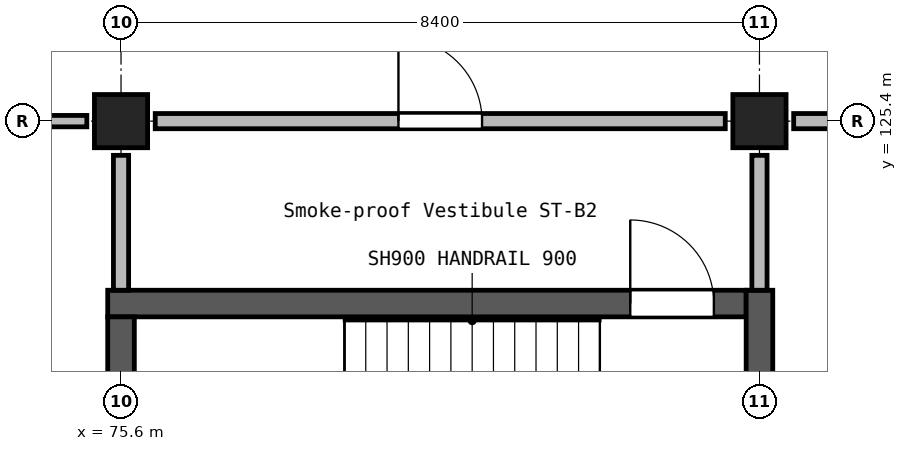
"""IFC4 building model, lengths in metres.
Left out: names, types, materials, properties, quantities, classifications, styles, units other than length and angle.
Written with IfcOpenShell. Run it as: python <this file> out.ifc"""

import sys

from ifc_helpers import new_model, si_unit, direction, frame, frame_2d, origin, origin_2d, place, context, subcontext, project, spatial, rectangle, extrude, element, fill, save


model = new_model("IFC4")
c1 = context("Model", 3, precision=1e-05, world=origin(), true_north=direction((0.0, 1.0)))
c2 = subcontext(c1, "Body", "Model", "MODEL_VIEW")
j1 = project(units=[si_unit("LENGTHUNIT", "METRE"), si_unit("PLANEANGLEUNIT", "RADIAN")], contexts=[c1])
p1 = place(None, origin())
s1 = spatial("IfcSite", under=j1, at=p1, CompositionType="ELEMENT")
p2 = place(p1, origin())
s2 = spatial("IfcBuilding", under=s1, at=p2, CompositionType="ELEMENT")
p3 = place(p2, frame((0.0, 0.0, 21.0)))
s3 = spatial("IfcBuildingStorey", under=s2, at=p3, CompositionType="ELEMENT", Elevation=21.0)
for number, where, z_axis, x_axis in (
    (1, (75.6, 125.4, 0.0), (0.0, 0.0, 1.0), (1.0, 0.0, 0.0)),
    (2, (84.0, 125.4, 0.0), (0.0, 0.0, 1.0), (1.0, 0.0, 0.0)),
):
    element("IfcColumn", number, at=place(p3, frame(where, z_axis=z_axis, x_axis=x_axis)), inside=s3, PredefinedType="COLUMN", context=c2, shape_type="SweptSolid", body=[
        extrude(rectangle(XDim=0.7, YDim=0.7, at=origin_2d()), origin(), (0.0, 0.0, 1.0), 3.9),
    ])
p4 = place(p3, frame((75.425, 123.0, 0.0), z_axis=(0.0, 0.0, 1.0), x_axis=(1.0, 0.0, 0.0)))
e3 = element("IfcWall", 3, at=p4, inside=s3, PredefinedType="SHEAR", context=c2, shape_type="SweptSolid", body=[
    extrude(rectangle(XDim=8.4, YDim=0.35, at=frame_2d((4.2, 0.0))), origin(), (0.0, 0.0, 1.0), 3.9),
])
p5 = place(p4, frame((6.875, 0.0, 0.0)))
e4 = element("IfcOpeningElement", 4, at=p5, cuts=e3, PredefinedType="OPENING", context=c2, shape_type="SweptSolid", body=[
    extrude(rectangle(XDim=1.1, YDim=2.1, at=frame_2d((0.55, 1.05))), frame((0.0, 0.185, 0.0), z_axis=(0.0, -1.0, 0.0), x_axis=(1.0, 0.0, 0.0)), (0.0, 0.0, 1.0), 0.37),
])
p6 = place(p3, frame((75.6, 117.425, 0.0), z_axis=(0.0, 0.0, 1.0), x_axis=(0.0, 1.0, 0.0)))
e5 = element("IfcWall", 5, at=p6, inside=s3, PredefinedType="SHEAR", context=c2, shape_type="SweptSolid", body=[
    extrude(rectangle(XDim=5.4, YDim=0.35, at=frame_2d((2.7, 0.0))), origin(), (0.0, 0.0, 1.0), 3.9),
])
p7 = place(p3, frame((84.0, 117.425, 0.0), z_axis=(0.0, 0.0, 1.0), x_axis=(0.0, 1.0, 0.0)))
e6 = element("IfcWall", 6, at=p7, inside=s3, PredefinedType="SHEAR", context=c2, shape_type="SweptSolid", body=[
    extrude(rectangle(XDim=5.75, YDim=0.35, at=frame_2d((2.875, 0.0))), origin(), (0.0, 0.0, 1.0), 3.9),
])
p8 = place(p3, frame((76.05, 125.4, 0.0), z_axis=(0.0, 0.0, 1.0), x_axis=(1.0, 0.0, 0.0)))
e7 = element("IfcWall", 7, at=p8, inside=s3, PredefinedType="SOLIDWALL", context=c2, shape_type="SweptSolid", body=[
    extrude(rectangle(XDim=7.5, YDim=0.2, at=frame_2d((3.75, 0.0))), origin(), (0.0, 0.0, 1.0), 3.6),
])
p9 = place(p8, frame((3.2, 0.0, 0.0)))
e8 = element("IfcOpeningElement", 8, at=p9, cuts=e7, PredefinedType="OPENING", context=c2, shape_type="SweptSolid", body=[
    extrude(rectangle(XDim=1.1, YDim=2.1, at=frame_2d((0.55, 1.05))), frame((0.0, 0.11, 0.0), z_axis=(0.0, -1.0, 0.0), x_axis=(1.0, 0.0, 0.0)), (0.0, 0.0, 1.0), 0.22),
])
p10 = place(p3, frame((84.45, 125.4, 0.0), z_axis=(0.0, 0.0, 1.0), x_axis=(1.0, 0.0, 0.0)))
e9 = element("IfcWall", 9, at=p10, inside=s3, PredefinedType="SOLIDWALL", context=c2, shape_type="SweptSolid", body=[
    extrude(rectangle(XDim=3.85, YDim=0.2, at=frame_2d((1.925, 0.0))), origin(), (0.0, 0.0, 1.0), 3.6),
])
p11 = place(p10, frame((1.15, 0.0, 0.0)))
e10 = element("IfcOpeningElement", 10, at=p11, cuts=e9, PredefinedType="OPENING", context=c2, shape_type="SweptSolid", body=[
    extrude(rectangle(XDim=1.0, YDim=2.1, at=frame_2d((0.5, 1.05))), frame((0.0, 0.11, 0.0), z_axis=(0.0, -1.0, 0.0), x_axis=(1.0, 0.0, 0.0)), (0.0, 0.0, 1.0), 0.22),
])
for number, where, z_axis, x_axis in (
    (11, (84.0, 123.175, 0.0), (0.0, 0.0, 1.0), (0.0, 1.0, 0.0)),
    (12, (75.6, 123.175, 0.0), (0.0, 0.0, 1.0), (0.0, 1.0, 0.0)),
):
    element("IfcWall", number, at=place(p3, frame(where, z_axis=z_axis, x_axis=x_axis)), inside=s3, PredefinedType="SOLIDWALL", context=c2, shape_type="SweptSolid", body=[
        extrude(rectangle(XDim=1.775, YDim=0.2, at=frame_2d((0.887, 0.0))), origin(), (0.0, 0.0, 1.0), 3.6),
    ])
p12 = place(p3, frame((67.65, 125.4, 0.0), z_axis=(0.0, 0.0, 1.0), x_axis=(1.0, 0.0, 0.0)))
e13 = element("IfcWall", 13, at=p12, inside=s3, PredefinedType="PARTITIONING", context=c2, shape_type="SweptSolid", body=[
    extrude(rectangle(XDim=7.5, YDim=0.15, at=frame_2d((3.75, 0.0))), origin(), (0.0, 0.0, 1.0), 3.6),
])
p13 = place(p12, frame((4.6, 0.0, 0.0)))
e14 = element("IfcOpeningElement", 14, at=p13, cuts=e13, PredefinedType="OPENING", context=c2, shape_type="SweptSolid", body=[
    extrude(rectangle(XDim=1.0, YDim=2.1, at=frame_2d((0.5, 1.05))), frame((0.0, 0.085, 0.0), z_axis=(0.0, -1.0, 0.0), x_axis=(1.0, 0.0, 0.0)), (0.0, 0.0, 1.0), 0.17),
])
p14 = place(p5, frame((1.1, 0.0, 0.0), z_axis=(0.0, 0.0, 1.0), x_axis=(-1.0, 0.0, 0.0)))
e15 = element("IfcDoor", 15, at=p14, inside=s3, OperationType="SINGLE_SWING_LEFT", PredefinedType="DOOR", context=c2, shape_type="SweptSolid", body=[
    extrude(rectangle(XDim=1.1, YDim=2.1, at=frame_2d((0.55, 1.05))), frame((0.0, 0.025, 0.0), z_axis=(0.0, -1.0, 0.0), x_axis=(1.0, 0.0, 0.0)), (0.0, 0.0, 1.0), 0.05),
])
fill(e4, e15)
p15 = place(p9, frame((1.1, 0.0, 0.0), z_axis=(0.0, 0.0, 1.0), x_axis=(-1.0, 0.0, 0.0)))
e16 = element("IfcDoor", 16, at=p15, inside=s3, OperationType="SINGLE_SWING_LEFT", PredefinedType="DOOR", context=c2, shape_type="SweptSolid", body=[
    extrude(rectangle(XDim=1.1, YDim=2.1, at=frame_2d((0.55, 1.05))), frame((0.0, 0.025, 0.0), z_axis=(0.0, -1.0, 0.0), x_axis=(1.0, 0.0, 0.0)), (0.0, 0.0, 1.0), 0.05),
])
fill(e8, e16)
save(model, sys.argv[1])
